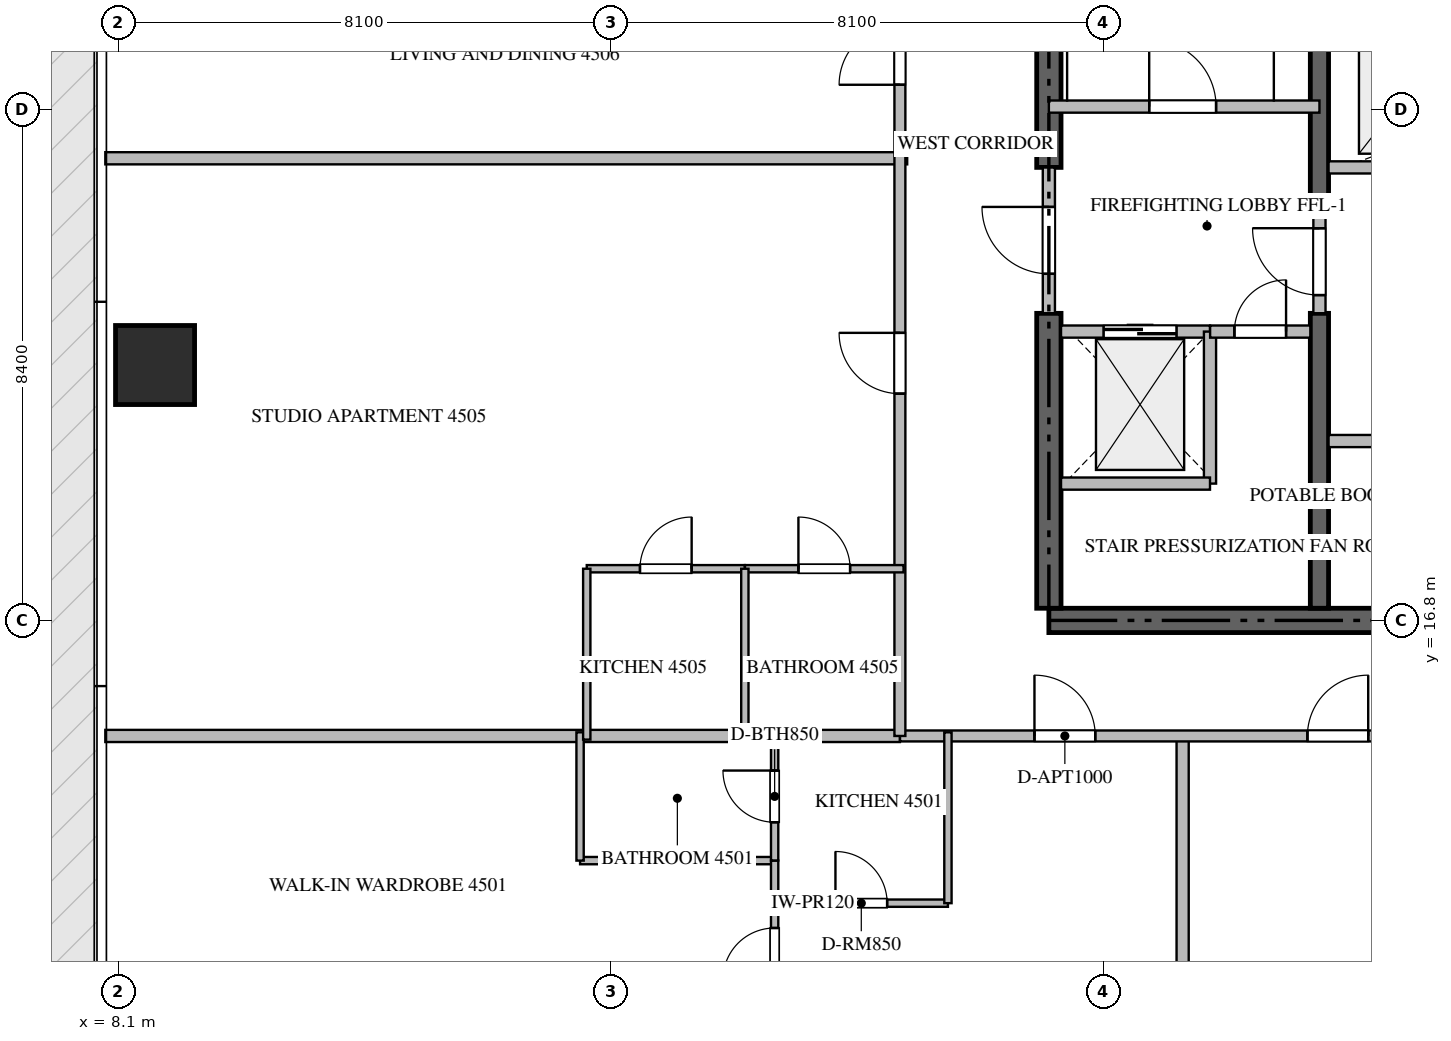
"""IFC4 building model, lengths in metres.
Left out: names, types, materials, properties, quantities, classifications, styles, units other than length and angle.
Written with IfcOpenShell. Run it as: python <this file> out.ifc"""

import sys

from ifc_helpers import new_model, si_unit, direction, frame, frame_2d, origin, origin_2d, place, context, subcontext, project, spatial, rectangle, extrude, source, transform, mapped, element, fill, save


model = new_model("IFC4")
c1 = context("Model", 3, precision=1e-05, world=origin(), true_north=direction((0.0, 1.0)))
c2 = subcontext(c1, "Body", "Model", "MODEL_VIEW")
j1 = project(units=[si_unit("LENGTHUNIT", "METRE"), si_unit("PLANEANGLEUNIT", "RADIAN")], contexts=[c1])
p1 = place(None, origin())
s1 = spatial("IfcSite", under=j1, at=p1, CompositionType="ELEMENT")
p2 = place(p1, origin())
s2 = spatial("IfcBuilding", under=s1, at=p2, CompositionType="ELEMENT")
p3 = place(p2, frame((0.0, 0.0, 180.15)))
s3 = spatial("IfcBuildingStorey", under=s2, at=p3, CompositionType="ELEMENT", Elevation=180.15)
p4 = place(p3, frame((23.4, 16.8, -0.26), z_axis=(0.0, 0.0, 1.0), x_axis=(1.0, 0.0, 0.0)))
e1 = element("IfcWall", 1, at=p4, inside=s3, PredefinedType="SHEAR", context=c2, shape_type="SweptSolid", body=[
    extrude(rectangle(XDim=18.0, YDim=0.4, at=frame_2d((9.0, 0.0))), origin(), (0.0, 0.0, 1.0), 3.748),
])
p5 = place(p3, frame((23.4, 17.0, -0.26), z_axis=(0.0, 0.0, 1.0), x_axis=(0.0, 1.0, 0.0)))
e2 = element("IfcWall", 2, at=p5, inside=s3, PredefinedType="SHEAR", context=c2, shape_type="SweptSolid", body=[
    extrude(rectangle(XDim=4.85, YDim=0.4, at=frame_2d((2.425, 0.0))), origin(), (0.0, 0.0, 1.0), 3.748),
])
p6 = place(p3, frame((23.4, 24.25, -0.26), z_axis=(0.0, 0.0, 1.0), x_axis=(0.0, 1.0, 0.0)))
e3 = element("IfcWall", 3, at=p6, inside=s3, PredefinedType="SHEAR", context=c2, shape_type="SweptSolid", body=[
    extrude(rectangle(XDim=9.15, YDim=0.4, at=frame_2d((4.575, 0.0))), origin(), (0.0, 0.0, 1.0), 3.748),
])
p7 = place(p3, frame((27.85, 17.0, -0.26), z_axis=(0.0, 0.0, 1.0), x_axis=(0.0, 1.0, 0.0)))
e4 = element("IfcWall", 4, at=p7, inside=s3, PredefinedType="SHEAR", context=c2, shape_type="SweptSolid", body=[
    extrude(rectangle(XDim=4.85, YDim=0.3, at=frame_2d((2.425, 0.0))), origin(), (0.0, 0.0, 1.0), 3.748),
])
p8 = place(p3, frame((27.85, 23.55, -0.26), z_axis=(0.0, 0.0, 1.0), x_axis=(0.0, 1.0, 0.0)))
e5 = element("IfcWall", 5, at=p8, inside=s3, PredefinedType="SHEAR", context=c2, shape_type="SweptSolid", body=[
    extrude(rectangle(XDim=9.85, YDim=0.3, at=frame_2d((4.925, 0.0))), origin(), (0.0, 0.0, 1.0), 3.748),
])
m1 = source(origin(), c2, "Body", "SweptSolid", [
    extrude(rectangle(XDim=1.3, YDim=1.3, at=origin_2d()), origin(), (0.0, 0.0, 1.0), 3.75),
])
p9 = place(p3, frame((8.7, 21.0, -0.26), z_axis=(0.0, 0.0, 1.0), x_axis=(1.0, 0.0, 0.0)))
e6 = element("IfcColumn", 6, at=p9, inside=s3, PredefinedType="COLUMN", context=c2, shape_type="MappedRepresentation", body=[
    mapped(m1, transform((0.0, 0.0, 0.0), scale=1.0)),
])
p10 = place(p3, frame((23.4, 25.25, 0.0), z_axis=(0.0, 0.0, 1.0), x_axis=(1.0, 0.0, 0.0)))
e7 = element("IfcWall", 7, at=p10, inside=s3, PredefinedType="STANDARD", context=c2, shape_type="SweptSolid", body=[
    extrude(rectangle(XDim=4.45, YDim=0.2, at=frame_2d((2.225, 0.0))), origin(), (0.0, 0.0, 1.0), 3.49),
])
p11 = place(p10, frame((1.65, 0.0, 0.0)))
e8 = element("IfcOpeningElement", 8, at=p11, cuts=e7, PredefinedType="OPENING", context=c2, shape_type="SweptSolid", body=[
    extrude(rectangle(XDim=1.1, YDim=2.15, at=frame_2d((0.55, 1.075))), frame((0.0, 0.11, 0.0), z_axis=(0.0, -1.0, 0.0), x_axis=(1.0, 0.0, 0.0)), (0.0, 0.0, 1.0), 0.22),
])
p12 = place(p3, frame((23.6, 21.55, 0.0), z_axis=(0.0, 0.0, 1.0), x_axis=(1.0, 0.0, 0.0)))
e9 = element("IfcWall", 9, at=p12, inside=s3, PredefinedType="STANDARD", context=c2, shape_type="SweptSolid", body=[
    extrude(rectangle(XDim=2.45, YDim=0.2, at=frame_2d((1.225, 0.0))), origin(), (0.0, 0.0, 1.0), 3.49),
])
p13 = place(p12, frame((0.7, 0.0, 0.0)))
e10 = element("IfcOpeningElement", 10, at=p13, cuts=e9, PredefinedType="OPENING", context=c2, shape_type="SweptSolid", body=[
    extrude(rectangle(XDim=1.2, YDim=2.2, at=frame_2d((0.6, 1.1))), frame((0.0, 0.11, 0.0), z_axis=(0.0, -1.0, 0.0), x_axis=(1.0, 0.0, 0.0)), (0.0, 0.0, 1.0), 0.22),
])
p14 = place(p3, frame((28.0, 24.25, 0.0), z_axis=(0.0, 0.0, 1.0), x_axis=(1.0, 0.0, 0.0)))
e11 = element("IfcWall", 11, at=p14, inside=s3, PredefinedType="STANDARD", context=c2, shape_type="SweptSolid", body=[
    extrude(rectangle(XDim=2.425, YDim=0.2, at=frame_2d((1.212, 0.0))), origin(), (0.0, 0.0, 1.0), 3.49),
])
p15 = place(p14, frame((0.75, 0.0, 0.0)))
e12 = element("IfcOpeningElement", 12, at=p15, cuts=e11, PredefinedType="OPENING", context=c2, shape_type="SweptSolid", body=[
    extrude(rectangle(XDim=1.1, YDim=2.2, at=frame_2d((0.55, 1.1))), frame((0.0, 0.11, 0.0), z_axis=(0.0, -1.0, 0.0), x_axis=(1.0, 0.0, 0.0)), (0.0, 0.0, 1.0), 0.22),
])
p16 = place(p3, frame((26.05, 19.05, 0.0), z_axis=(0.0, 0.0, 1.0), x_axis=(0.0, 1.0, 0.0)))
e13 = element("IfcWall", 13, at=p16, inside=s3, PredefinedType="STANDARD", context=c2, shape_type="SweptSolid", body=[
    extrude(rectangle(XDim=2.5, YDim=0.2, at=frame_2d((1.25, 0.0))), origin(), (0.0, 0.0, 1.0), 3.49),
])
p17 = place(p3, frame((23.6, 19.05, 0.0), z_axis=(0.0, 0.0, 1.0), x_axis=(1.0, 0.0, 0.0)))
e14 = element("IfcWall", 14, at=p17, inside=s3, PredefinedType="STANDARD", context=c2, shape_type="SweptSolid", body=[
    extrude(rectangle(XDim=2.45, YDim=0.2, at=frame_2d((1.225, 0.0))), origin(), (0.0, 0.0, 1.0), 3.49),
])
p18 = place(p3, frame((26.052, 21.55, 0.0), z_axis=(0.0, 0.0, 1.0), x_axis=(1.0, 0.0, 0.0)))
e15 = element("IfcWall", 15, at=p18, inside=s3, PredefinedType="STANDARD", context=c2, shape_type="SweptSolid", body=[
    extrude(rectangle(XDim=1.648, YDim=0.2, at=frame_2d((0.824, 0.0))), origin(), (0.0, 0.0, 1.0), 3.49),
])
p19 = place(p18, frame((0.399, 0.0, 0.0)))
e16 = element("IfcOpeningElement", 16, at=p19, cuts=e15, PredefinedType="OPENING", context=c2, shape_type="SweptSolid", body=[
    extrude(rectangle(XDim=0.85, YDim=2.1, at=frame_2d((0.425, 1.05))), frame((0.0, 0.11, 0.0), z_axis=(0.0, -1.0, 0.0), x_axis=(1.0, 0.0, 0.0)), (0.0, 0.0, 1.0), 0.22),
])
p20 = place(p3, frame((23.4, 21.852, 0.0), z_axis=(0.0, 0.0, 1.0), x_axis=(0.0, 1.0, 0.0)))
e17 = element("IfcWall", 17, at=p20, inside=s3, PredefinedType="STANDARD", context=c2, shape_type="SweptSolid", body=[
    extrude(rectangle(XDim=2.396, YDim=0.2, at=frame_2d((1.198, 0.0))), origin(), (0.0, 0.0, 1.0), 3.49),
])
p21 = place(p20, frame((0.648, 0.0, 0.0)))
e18 = element("IfcOpeningElement", 18, at=p21, cuts=e17, PredefinedType="OPENING", context=c2, shape_type="SweptSolid", body=[
    extrude(rectangle(XDim=1.1, YDim=2.15, at=frame_2d((0.55, 1.075))), frame((0.0, 0.11, 0.0), z_axis=(0.0, -1.0, 0.0), x_axis=(1.0, 0.0, 0.0)), (0.0, 0.0, 1.0), 0.22),
])
p22 = place(p3, frame((27.85, 21.852, 0.0), z_axis=(0.0, 0.0, 1.0), x_axis=(0.0, 1.0, 0.0)))
e19 = element("IfcWall", 19, at=p22, inside=s3, PredefinedType="STANDARD", context=c2, shape_type="SweptSolid", body=[
    extrude(rectangle(XDim=1.696, YDim=0.2, at=frame_2d((0.848, 0.0))), origin(), (0.0, 0.0, 1.0), 3.49),
])
p23 = place(p22, frame((0.298, 0.0, 0.0)))
e20 = element("IfcOpeningElement", 20, at=p23, cuts=e19, PredefinedType="OPENING", context=c2, shape_type="SweptSolid", body=[
    extrude(rectangle(XDim=1.1, YDim=2.15, at=frame_2d((0.55, 1.075))), frame((0.0, 0.11, 0.0), z_axis=(0.0, -1.0, 0.0), x_axis=(1.0, 0.0, 0.0)), (0.0, 0.0, 1.0), 0.22),
])
p24 = place(p3, frame((28.0, 19.75, 0.0), z_axis=(0.0, 0.0, 1.0), x_axis=(1.0, 0.0, 0.0)))
e21 = element("IfcWall", 21, at=p24, inside=s3, PredefinedType="STANDARD", context=c2, shape_type="SweptSolid", body=[
    extrude(rectangle(XDim=3.4, YDim=0.2, at=frame_2d((1.7, 0.0))), origin(), (0.0, 0.0, 1.0), 3.49),
])
p25 = place(p24, frame((1.275, 0.0, 0.0)))
e22 = element("IfcOpeningElement", 22, at=p25, cuts=e21, PredefinedType="OPENING", context=c2, shape_type="SweptSolid", body=[
    extrude(rectangle(XDim=0.85, YDim=2.1, at=frame_2d((0.425, 1.05))), frame((0.0, 0.11, 0.0), z_axis=(0.0, -1.0, 0.0), x_axis=(1.0, 0.0, 0.0)), (0.0, 0.0, 1.0), 0.22),
])
p26 = place(p3, frame((25.6, 1.482, 0.0), z_axis=(0.0, 0.0, 1.0), x_axis=(0.0, 1.0, 0.0)))
e23 = element("IfcWall", 23, at=p26, inside=s3, PredefinedType="PARTITIONING", context=c2, shape_type="SweptSolid", body=[
    extrude(rectangle(XDim=13.418, YDim=0.2, at=frame_2d((6.709, 0.0))), origin(), (0.0, 0.0, 1.0), 3.49),
])
p27 = place(p3, frame((7.882, 24.4, 0.0), z_axis=(0.0, 0.0, 1.0), x_axis=(1.0, 0.0, 0.0)))
e24 = element("IfcWall", 24, at=p27, inside=s3, PredefinedType="PARTITIONING", context=c2, shape_type="SweptSolid", body=[
    extrude(rectangle(XDim=13.188, YDim=0.2, at=frame_2d((6.594, 0.0))), origin(), (0.0, 0.0, 1.0), 3.49),
])
p28 = place(p3, frame((7.882, 14.9, 0.0), z_axis=(0.0, 0.0, 1.0), x_axis=(1.0, 0.0, 0.0)))
e25 = element("IfcWall", 25, at=p28, inside=s3, PredefinedType="PARTITIONING", context=c2, shape_type="SweptSolid", body=[
    extrude(rectangle(XDim=13.068, YDim=0.2, at=frame_2d((6.534, 0.0))), origin(), (0.0, 0.0, 1.0), 3.49),
])
p29 = place(p3, frame((20.952, 14.9, 0.0), z_axis=(0.0, 0.0, 1.0), x_axis=(1.0, 0.0, 0.0)))
e26 = element("IfcWall", 26, at=p29, inside=s3, PredefinedType="PARTITIONING", context=c2, shape_type="SweptSolid", body=[
    extrude(rectangle(XDim=22.896, YDim=0.18, at=frame_2d((11.448, 0.0))), origin(), (0.0, 0.0, 1.0), 3.49),
])
p30 = place(p29, frame((2.211, 0.0, 0.0)))
e27 = element("IfcOpeningElement", 27, at=p30, cuts=e26, PredefinedType="OPENING", context=c2, shape_type="SweptSolid", body=[
    extrude(rectangle(XDim=1.0, YDim=2.15, at=frame_2d((0.5, 1.075))), frame((0.0, 0.1, 0.0), z_axis=(0.0, -1.0, 0.0), x_axis=(1.0, 0.0, 0.0)), (0.0, 0.0, 1.0), 0.2),
])
p31 = place(p29, frame((6.7, 0.0, 0.0)))
e28 = element("IfcOpeningElement", 28, at=p31, cuts=e26, PredefinedType="OPENING", context=c2, shape_type="SweptSolid", body=[
    extrude(rectangle(XDim=1.0, YDim=2.15, at=frame_2d((0.5, 1.075))), frame((0.0, 0.1, 0.0), z_axis=(0.0, -1.0, 0.0), x_axis=(1.0, 0.0, 0.0)), (0.0, 0.0, 1.0), 0.2),
])
p32 = place(p29, frame((19.509, 0.0, 0.0)))
e29 = element("IfcOpeningElement", 29, at=p32, cuts=e26, PredefinedType="OPENING", context=c2, shape_type="SweptSolid", body=[
    extrude(rectangle(XDim=1.0, YDim=2.15, at=frame_2d((0.5, 1.075))), frame((0.0, 0.1, 0.0), z_axis=(0.0, -1.0, 0.0), x_axis=(1.0, 0.0, 0.0)), (0.0, 0.0, 1.0), 0.2),
])
p33 = place(p3, frame((20.95, 14.9, 0.0), z_axis=(0.0, 0.0, 1.0), x_axis=(0.0, 1.0, 0.0)))
e30 = element("IfcWall", 30, at=p33, inside=s3, PredefinedType="PARTITIONING", context=c2, shape_type="SweptSolid", body=[
    extrude(rectangle(XDim=18.7, YDim=0.18, at=frame_2d((9.35, 0.0))), origin(), (0.0, 0.0, 1.0), 3.49),
])
p34 = place(p33, frame((5.629, 0.0, 0.0)))
e31 = element("IfcOpeningElement", 31, at=p34, cuts=e30, PredefinedType="OPENING", context=c2, shape_type="SweptSolid", body=[
    extrude(rectangle(XDim=1.0, YDim=2.15, at=frame_2d((0.5, 1.075))), frame((0.0, 0.1, 0.0), z_axis=(0.0, -1.0, 0.0), x_axis=(1.0, 0.0, 0.0)), (0.0, 0.0, 1.0), 0.2),
])
p35 = place(p33, frame((10.709, 0.0, 0.0)))
e32 = element("IfcOpeningElement", 32, at=p35, cuts=e30, PredefinedType="OPENING", context=c2, shape_type="SweptSolid", body=[
    extrude(rectangle(XDim=1.0, YDim=2.15, at=frame_2d((0.5, 1.075))), frame((0.0, 0.1, 0.0), z_axis=(0.0, -1.0, 0.0), x_axis=(1.0, 0.0, 0.0)), (0.0, 0.0, 1.0), 0.2),
])
p36 = place(p3, frame((18.89, 12.15, 0.0), z_axis=(0.0, 0.0, 1.0), x_axis=(1.0, 0.0, 0.0)))
e33 = element("IfcWall", 33, at=p36, inside=s3, PredefinedType="PARTITIONING", context=c2, shape_type="SweptSolid", body=[
    extrude(rectangle(XDim=2.85, YDim=0.12, at=frame_2d((1.425, 0.0))), origin(), (0.0, 0.0, 1.0), 3.49),
])
p37 = place(p36, frame((1.0, 0.0, 0.0)))
e34 = element("IfcOpeningElement", 34, at=p37, cuts=e33, PredefinedType="OPENING", context=c2, shape_type="SweptSolid", body=[
    extrude(rectangle(XDim=0.85, YDim=2.1, at=frame_2d((0.425, 1.05))), frame((0.0, 0.07, 0.0), z_axis=(0.0, -1.0, 0.0), x_axis=(1.0, 0.0, 0.0)), (0.0, 0.0, 1.0), 0.14),
])
p38 = place(p3, frame((21.74, 12.15, 0.0), z_axis=(0.0, 0.0, 1.0), x_axis=(0.0, 1.0, 0.0)))
e35 = element("IfcWall", 35, at=p38, inside=s3, PredefinedType="PARTITIONING", context=c2, shape_type="SweptSolid", body=[
    extrude(rectangle(XDim=2.81, YDim=0.12, at=frame_2d((1.405, 0.0))), origin(), (0.0, 0.0, 1.0), 3.49),
])
p39 = place(p3, frame((15.69, 12.85, 0.0), z_axis=(0.0, 0.0, 1.0), x_axis=(1.0, 0.0, 0.0)))
e36 = element("IfcWall", 36, at=p39, inside=s3, PredefinedType="PARTITIONING", context=c2, shape_type="SweptSolid", body=[
    extrude(rectangle(XDim=3.2, YDim=0.12, at=frame_2d((1.6, 0.0))), origin(), (0.0, 0.0, 1.0), 3.49),
])
p40 = place(p3, frame((15.69, 12.85, 0.0), z_axis=(0.0, 0.0, 1.0), x_axis=(0.0, 1.0, 0.0)))
e37 = element("IfcWall", 37, at=p40, inside=s3, PredefinedType="PARTITIONING", context=c2, shape_type="SweptSolid", body=[
    extrude(rectangle(XDim=2.11, YDim=0.12, at=frame_2d((1.055, 0.0))), origin(), (0.0, 0.0, 1.0), 3.49),
])
p41 = place(p3, frame((18.89, 9.783, 0.0), z_axis=(0.0, 0.0, 1.0), x_axis=(0.0, 1.0, 0.0)))
e38 = element("IfcWall", 38, at=p41, inside=s3, PredefinedType="PARTITIONING", context=c2, shape_type="SweptSolid", body=[
    extrude(rectangle(XDim=3.067, YDim=0.12, at=frame_2d((1.534, 0.0))), origin(), (0.0, 0.0, 1.0), 3.49),
])
p42 = place(p41, frame((1.109, 0.0, 0.0)))
e39 = element("IfcOpeningElement", 39, at=p42, cuts=e38, PredefinedType="OPENING", context=c2, shape_type="SweptSolid", body=[
    extrude(rectangle(XDim=0.85, YDim=2.1, at=frame_2d((0.425, 1.05))), frame((0.0, 0.07, 0.0), z_axis=(0.0, -1.0, 0.0), x_axis=(1.0, 0.0, 0.0)), (0.0, 0.0, 1.0), 0.14),
])
p43 = place(p3, frame((18.89, 12.852, 0.0), z_axis=(0.0, 0.0, 1.0), x_axis=(0.0, 1.0, 0.0)))
e40 = element("IfcWall", 40, at=p43, inside=s3, PredefinedType="PARTITIONING", context=c2, shape_type="SweptSolid", body=[
    extrude(rectangle(XDim=2.108, YDim=0.12, at=frame_2d((1.054, 0.0))), origin(), (0.0, 0.0, 1.0), 3.49),
])
p44 = place(p43, frame((0.629, 0.0, 0.0)))
e41 = element("IfcOpeningElement", 41, at=p44, cuts=e40, PredefinedType="OPENING", context=c2, shape_type="SweptSolid", body=[
    extrude(rectangle(XDim=0.85, YDim=2.1, at=frame_2d((0.425, 1.05))), frame((0.0, 0.07, 0.0), z_axis=(0.0, -1.0, 0.0), x_axis=(1.0, 0.0, 0.0)), (0.0, 0.0, 1.0), 0.14),
])
p45 = place(p3, frame((15.8, 17.65, 0.0), z_axis=(0.0, 0.0, 1.0), x_axis=(1.0, 0.0, 0.0)))
e42 = element("IfcWall", 42, at=p45, inside=s3, PredefinedType="PARTITIONING", context=c2, shape_type="SweptSolid", body=[
    extrude(rectangle(XDim=2.6, YDim=0.12, at=frame_2d((1.3, 0.0))), origin(), (0.0, 0.0, 1.0), 3.49),
])
p46 = place(p45, frame((0.875, 0.0, 0.0)))
e43 = element("IfcOpeningElement", 43, at=p46, cuts=e42, PredefinedType="OPENING", context=c2, shape_type="SweptSolid", body=[
    extrude(rectangle(XDim=0.85, YDim=2.1, at=frame_2d((0.425, 1.05))), frame((0.0, 0.07, 0.0), z_axis=(0.0, -1.0, 0.0), x_axis=(1.0, 0.0, 0.0)), (0.0, 0.0, 1.0), 0.14),
])
p47 = place(p3, frame((18.402, 17.65, 0.0), z_axis=(0.0, 0.0, 1.0), x_axis=(1.0, 0.0, 0.0)))
e44 = element("IfcWall", 44, at=p47, inside=s3, PredefinedType="PARTITIONING", context=c2, shape_type="SweptSolid", body=[
    extrude(rectangle(XDim=2.608, YDim=0.12, at=frame_2d((1.304, 0.0))), origin(), (0.0, 0.0, 1.0), 3.49),
])
p48 = place(p47, frame((0.879, 0.0, 0.0)))
e45 = element("IfcOpeningElement", 45, at=p48, cuts=e44, PredefinedType="OPENING", context=c2, shape_type="SweptSolid", body=[
    extrude(rectangle(XDim=0.85, YDim=2.1, at=frame_2d((0.425, 1.05))), frame((0.0, 0.07, 0.0), z_axis=(0.0, -1.0, 0.0), x_axis=(1.0, 0.0, 0.0)), (0.0, 0.0, 1.0), 0.14),
])
for number, where, z_axis, x_axis in (
    (46, (18.4, 14.84, 0.0), (0.0, 0.0, 1.0), (0.0, 1.0, 0.0)),
    (47, (15.8, 14.84, 0.0), (0.0, 0.0, 1.0), (0.0, 1.0, 0.0)),
):
    element("IfcWall", number, at=place(p3, frame(where, z_axis=z_axis, x_axis=x_axis)), inside=s3, PredefinedType="PARTITIONING", context=c2, shape_type="SweptSolid", body=[
        extrude(rectangle(XDim=2.81, YDim=0.12, at=frame_2d((1.405, 0.0))), origin(), (0.0, 0.0, 1.0), 3.49),
    ])
m2 = source(origin(), c2, "Body", "SweptSolid", [
    extrude(rectangle(XDim=1.1, YDim=2.15, at=frame_2d((0.55, 1.075))), frame((0.0, 0.025, 0.0), z_axis=(0.0, -1.0, 0.0), x_axis=(1.0, 0.0, 0.0)), (0.0, 0.0, 1.0), 0.05),
])
p49 = place(p11, origin())
e48 = element("IfcDoor", 48, at=p49, inside=s3, OperationType="SINGLE_SWING_LEFT", PredefinedType="DOOR", context=c2, shape_type="MappedRepresentation", body=[
    mapped(m2, transform((0.0, 0.0, 0.0), scale=1.0)),
])
fill(e8, e48)
m3 = source(origin(), c2, "Body", "SweptSolid", [
    extrude(rectangle(XDim=1.2, YDim=2.2, at=frame_2d((0.6, 1.1))), frame((0.0, 0.025, 0.0), z_axis=(0.0, -1.0, 0.0), x_axis=(1.0, 0.0, 0.0)), (0.0, 0.0, 1.0), 0.05),
])
p50 = place(p13, origin())
e49 = element("IfcDoor", 49, at=p50, inside=s3, OperationType="DOUBLE_DOOR_SLIDING", PredefinedType="DOOR", context=c2, shape_type="MappedRepresentation", body=[
    mapped(m3, transform((0.0, 0.0, 0.0), scale=1.0)),
])
fill(e10, e49)
m4 = source(origin(), c2, "Body", "SweptSolid", [
    extrude(rectangle(XDim=0.85, YDim=2.1, at=frame_2d((0.425, 1.05))), frame((0.0, 0.025, 0.0), z_axis=(0.0, -1.0, 0.0), x_axis=(1.0, 0.0, 0.0)), (0.0, 0.0, 1.0), 0.05),
])
p51 = place(p19, origin())
e50 = element("IfcDoor", 50, at=p51, inside=s3, OperationType="SINGLE_SWING_RIGHT", PredefinedType="DOOR", context=c2, shape_type="MappedRepresentation", body=[
    mapped(m4, transform((0.0, 0.0, 0.0), scale=1.0)),
])
fill(e16, e50)
p52 = place(p21, origin())
e51 = element("IfcDoor", 51, at=p52, inside=s3, OperationType="SINGLE_SWING_RIGHT", PredefinedType="DOOR", context=c2, shape_type="MappedRepresentation", body=[
    mapped(m2, transform((0.0, 0.0, 0.0), scale=1.0)),
])
fill(e18, e51)
p53 = place(p23, origin())
e52 = element("IfcDoor", 52, at=p53, inside=s3, OperationType="SINGLE_SWING_RIGHT", PredefinedType="DOOR", context=c2, shape_type="MappedRepresentation", body=[
    mapped(m2, transform((0.0, 0.0, 0.0), scale=1.0)),
])
fill(e20, e52)
m5 = source(origin(), c2, "Body", "SweptSolid", [
    extrude(rectangle(XDim=1.0, YDim=2.15, at=frame_2d((0.5, 1.075))), frame((0.0, 0.025, 0.0), z_axis=(0.0, -1.0, 0.0), x_axis=(1.0, 0.0, 0.0)), (0.0, 0.0, 1.0), 0.05),
])
p54 = place(p30, origin())
e53 = element("IfcDoor", 53, at=p54, inside=s3, OperationType="SINGLE_SWING_LEFT", PredefinedType="DOOR", context=c2, shape_type="MappedRepresentation", body=[
    mapped(m5, transform((0.0, 0.0, 0.0), scale=1.0)),
])
fill(e27, e53)
p55 = place(p31, origin())
e54 = element("IfcDoor", 54, at=p55, inside=s3, OperationType="SINGLE_SWING_RIGHT", PredefinedType="DOOR", context=c2, shape_type="MappedRepresentation", body=[
    mapped(m5, transform((0.0, 0.0, 0.0), scale=1.0)),
])
fill(e28, e54)
p56 = place(p34, origin())
e55 = element("IfcDoor", 55, at=p56, inside=s3, OperationType="SINGLE_SWING_RIGHT", PredefinedType="DOOR", context=c2, shape_type="MappedRepresentation", body=[
    mapped(m5, transform((0.0, 0.0, 0.0), scale=1.0)),
])
fill(e31, e55)
p57 = place(p35, origin())
e56 = element("IfcDoor", 56, at=p57, inside=s3, OperationType="SINGLE_SWING_LEFT", PredefinedType="DOOR", context=c2, shape_type="MappedRepresentation", body=[
    mapped(m5, transform((0.0, 0.0, 0.0), scale=1.0)),
])
fill(e32, e56)
p58 = place(p37, origin())
e57 = element("IfcDoor", 57, at=p58, inside=s3, OperationType="SINGLE_SWING_LEFT", PredefinedType="DOOR", context=c2, shape_type="MappedRepresentation", body=[
    mapped(m4, transform((0.0, 0.0, 0.0), scale=1.0)),
])
fill(e34, e57)
p59 = place(p42, origin())
e58 = element("IfcDoor", 58, at=p59, inside=s3, OperationType="SINGLE_SWING_LEFT", PredefinedType="DOOR", context=c2, shape_type="MappedRepresentation", body=[
    mapped(m4, transform((0.0, 0.0, 0.0), scale=1.0)),
])
fill(e39, e58)
p60 = place(p44, origin())
e59 = element("IfcDoor", 59, at=p60, inside=s3, OperationType="SINGLE_SWING_RIGHT", PredefinedType="DOOR", context=c2, shape_type="MappedRepresentation", body=[
    mapped(m4, transform((0.0, 0.0, 0.0), scale=1.0)),
])
fill(e41, e59)
p61 = place(p46, origin())
e60 = element("IfcDoor", 60, at=p61, inside=s3, OperationType="SINGLE_SWING_RIGHT", PredefinedType="DOOR", context=c2, shape_type="MappedRepresentation", body=[
    mapped(m4, transform((0.0, 0.0, 0.0), scale=1.0)),
])
fill(e43, e60)
p62 = place(p48, origin())
e61 = element("IfcDoor", 61, at=p62, inside=s3, OperationType="SINGLE_SWING_LEFT", PredefinedType="DOOR", context=c2, shape_type="MappedRepresentation", body=[
    mapped(m4, transform((0.0, 0.0, 0.0), scale=1.0)),
])
fill(e45, e61)
save(model, sys.argv[1])
